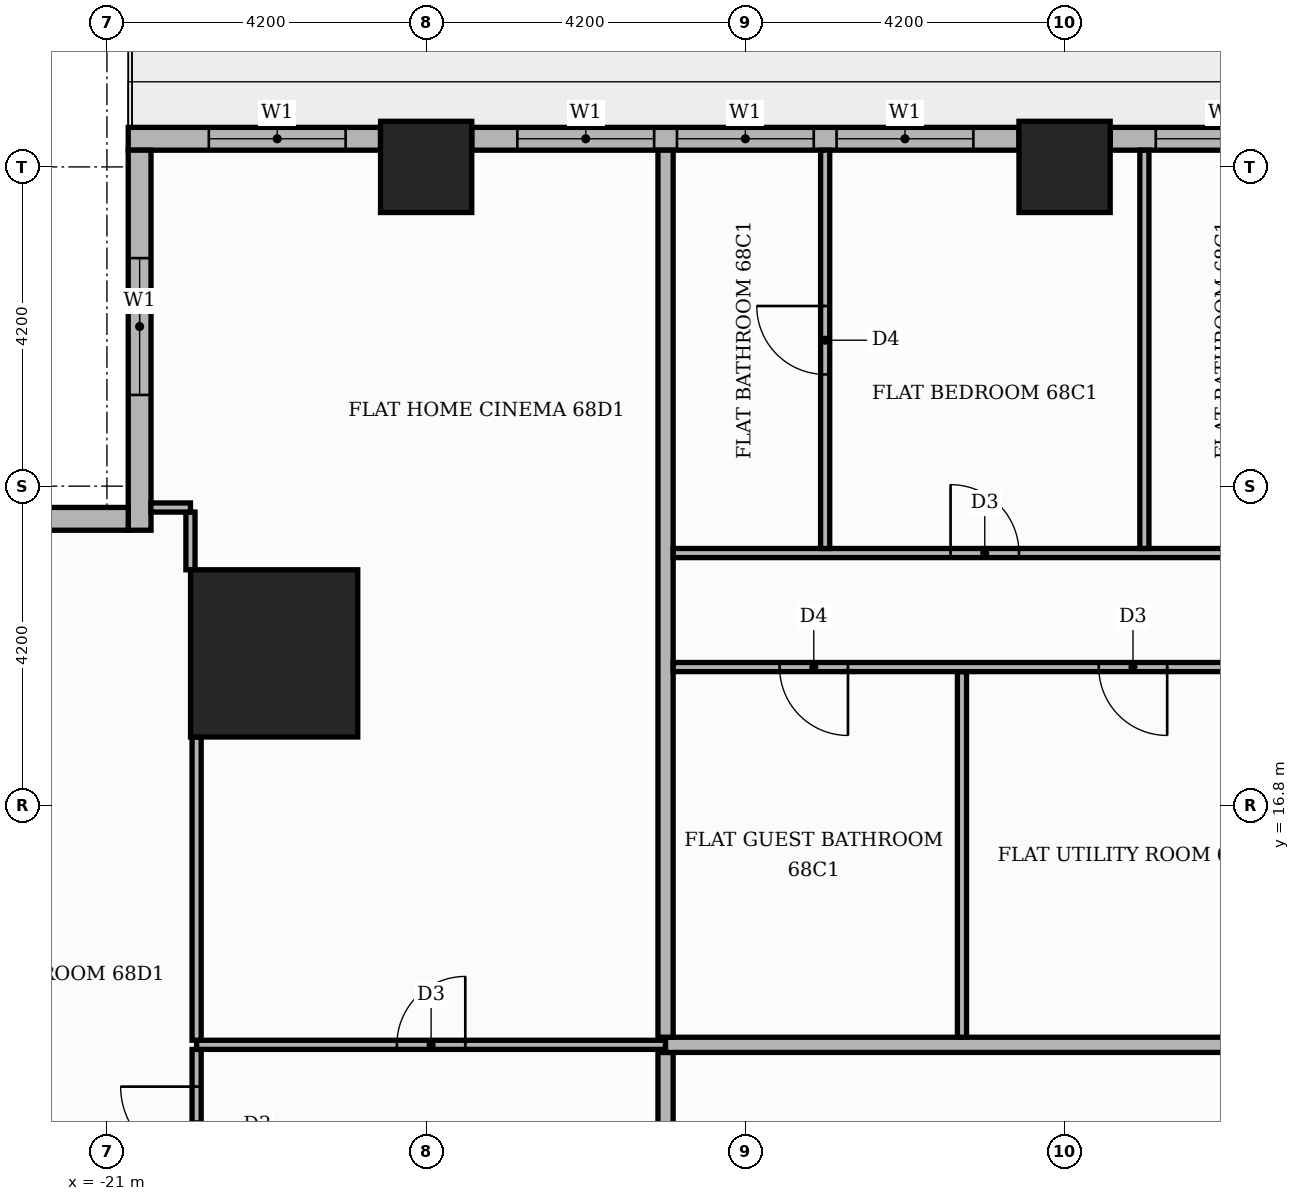
"""IFC4 building model, lengths in metres.
Left out: names, types, materials, properties, quantities, classifications, styles, units other than length and angle.
Written with IfcOpenShell. Run it as: python <this file> out.ifc"""

import sys

from ifc_helpers import new_model, si_unit, direction, frame, frame_2d, origin, origin_2d, place, context, subcontext, project, spatial, rectangle, extrude, element, fill, save


model = new_model("IFC4")
c1 = context("Model", 3, precision=1e-05, world=origin(), true_north=direction((0.0, 1.0)))
c2 = subcontext(c1, "Body", "Model", "MODEL_VIEW")
j1 = project(units=[si_unit("LENGTHUNIT", "METRE"), si_unit("PLANEANGLEUNIT", "RADIAN")], contexts=[c1])
p1 = place(None, origin())
s1 = spatial("IfcSite", under=j1, at=p1, CompositionType="ELEMENT")
p2 = place(p1, origin())
s2 = spatial("IfcBuilding", under=s1, at=p2, CompositionType="ELEMENT")
p3 = place(p2, frame((0.0, 0.0, 283.5)))
s3 = spatial("IfcBuildingStorey", under=s2, at=p3, CompositionType="ELEMENT", Elevation=283.5)
p4 = place(p3, frame((-18.8, 18.8, 0.0), z_axis=(0.0, 0.0, 1.0), x_axis=(1.0, 0.0, 0.0)))
e1 = element("IfcColumn", 1, at=p4, inside=s3, PredefinedType="COLUMN", context=c2, shape_type="SweptSolid", body=[
    extrude(rectangle(XDim=2.2, YDim=2.2, at=origin_2d()), origin(), (0.0, 0.0, 1.0), 3.9),
])
for number, where, z_axis, x_axis in (
    (2, (-8.4, 25.2, 0.0), (0.0, 0.0, 1.0), (1.0, 0.0, 0.0)),
    (3, (-16.8, 25.2, 0.0), (0.0, 0.0, 1.0), (1.0, 0.0, 0.0)),
):
    element("IfcColumn", number, at=place(p3, frame(where, z_axis=z_axis, x_axis=x_axis)), inside=s3, PredefinedType="COLUMN", context=c2, shape_type="SweptSolid", body=[
        extrude(rectangle(XDim=1.2, YDim=1.2, at=origin_2d()), origin(), (0.0, 0.0, 1.0), 3.9),
    ])
p5 = place(p3, frame((-0.6, 25.57, 0.0), z_axis=(0.0, 0.0, 1.0), x_axis=(-1.0, 0.0, 0.0)))
e4 = element("IfcWall", 4, at=p5, inside=s3, PredefinedType="STANDARD", context=c2, shape_type="SweptSolid", body=[
    extrude(rectangle(XDim=7.2, YDim=0.3, at=frame_2d((3.6, 0.0))), origin(), (0.0, 0.0, 1.0), 3.4),
])
p6 = place(p5, frame((0.6, 0.0, 0.9)))
e5 = element("IfcOpeningElement", 5, at=p6, cuts=e4, PredefinedType="OPENING", context=c2, shape_type="SweptSolid", body=[
    extrude(rectangle(XDim=3.9, YDim=2.1, at=frame_2d((1.95, 1.05))), frame((0.0, 0.16, 0.0), z_axis=(0.0, -1.0, 0.0), x_axis=(1.0, 0.0, 0.0)), (0.0, 0.0, 1.0), 0.32),
])
p7 = place(p5, frame((4.8, 0.0, 0.9)))
e6 = element("IfcOpeningElement", 6, at=p7, cuts=e4, PredefinedType="OPENING", context=c2, shape_type="SweptSolid", body=[
    extrude(rectangle(XDim=1.8, YDim=2.1, at=frame_2d((0.9, 1.05))), frame((0.0, 0.16, 0.0), z_axis=(0.0, -1.0, 0.0), x_axis=(1.0, 0.0, 0.0)), (0.0, 0.0, 1.0), 0.32),
])
p8 = place(p3, frame((-9.0, 25.57, 0.0), z_axis=(0.0, 0.0, 1.0), x_axis=(-1.0, 0.0, 0.0)))
e7 = element("IfcWall", 7, at=p8, inside=s3, PredefinedType="STANDARD", context=c2, shape_type="SweptSolid", body=[
    extrude(rectangle(XDim=7.2, YDim=0.3, at=frame_2d((3.6, 0.0))), origin(), (0.0, 0.0, 1.0), 3.4),
])
p9 = place(p8, frame((0.6, 0.0, 0.9)))
e8 = element("IfcOpeningElement", 8, at=p9, cuts=e7, PredefinedType="OPENING", context=c2, shape_type="SweptSolid", body=[
    extrude(rectangle(XDim=1.8, YDim=2.1, at=frame_2d((0.9, 1.05))), frame((0.0, 0.16, 0.0), z_axis=(0.0, -1.0, 0.0), x_axis=(1.0, 0.0, 0.0)), (0.0, 0.0, 1.0), 0.32),
])
p10 = place(p8, frame((2.7, 0.0, 0.9)))
e9 = element("IfcOpeningElement", 9, at=p10, cuts=e7, PredefinedType="OPENING", context=c2, shape_type="SweptSolid", body=[
    extrude(rectangle(XDim=1.8, YDim=2.1, at=frame_2d((0.9, 1.05))), frame((0.0, 0.16, 0.0), z_axis=(0.0, -1.0, 0.0), x_axis=(1.0, 0.0, 0.0)), (0.0, 0.0, 1.0), 0.32),
])
p11 = place(p8, frame((4.8, 0.0, 0.9)))
e10 = element("IfcOpeningElement", 10, at=p11, cuts=e7, PredefinedType="OPENING", context=c2, shape_type="SweptSolid", body=[
    extrude(rectangle(XDim=1.8, YDim=2.1, at=frame_2d((0.9, 1.05))), frame((0.0, 0.16, 0.0), z_axis=(0.0, -1.0, 0.0), x_axis=(1.0, 0.0, 0.0)), (0.0, 0.0, 1.0), 0.32),
])
p12 = place(p3, frame((-17.4, 25.57, 0.0), z_axis=(0.0, 0.0, 1.0), x_axis=(-1.0, 0.0, 0.0)))
e11 = element("IfcWall", 11, at=p12, inside=s3, PredefinedType="STANDARD", context=c2, shape_type="SweptSolid", body=[
    extrude(rectangle(XDim=3.32, YDim=0.3, at=frame_2d((1.66, 0.0))), origin(), (0.0, 0.0, 1.0), 3.4),
])
p13 = place(p12, frame((0.459, 0.0, 0.9)))
e12 = element("IfcOpeningElement", 12, at=p13, cuts=e11, PredefinedType="OPENING", context=c2, shape_type="SweptSolid", body=[
    extrude(rectangle(XDim=1.8, YDim=2.1, at=frame_2d((0.9, 1.05))), frame((0.0, 0.16, 0.0), z_axis=(0.0, -1.0, 0.0), x_axis=(1.0, 0.0, 0.0)), (0.0, 0.0, 1.0), 0.32),
])
p14 = place(p3, frame((-20.57, 25.42, 0.0), z_axis=(0.0, 0.0, 1.0), x_axis=(0.0, -1.0, 0.0)))
e13 = element("IfcWall", 13, at=p14, inside=s3, PredefinedType="STANDARD", context=c2, shape_type="SweptSolid", body=[
    extrude(rectangle(XDim=5.0, YDim=0.3, at=frame_2d((2.5, 0.0))), origin(), (0.0, 0.0, 1.0), 3.4),
])
p15 = place(p14, frame((1.42, 0.0, 0.9)))
e14 = element("IfcOpeningElement", 14, at=p15, cuts=e13, PredefinedType="OPENING", context=c2, shape_type="SweptSolid", body=[
    extrude(rectangle(XDim=1.8, YDim=2.1, at=frame_2d((0.9, 1.05))), frame((0.0, 0.16, 0.0), z_axis=(0.0, -1.0, 0.0), x_axis=(1.0, 0.0, 0.0)), (0.0, 0.0, 1.0), 0.32),
])
p16 = place(p3, frame((-20.72, 20.57, 0.0), z_axis=(0.0, 0.0, 1.0), x_axis=(-1.0, 0.0, 0.0)))
e15 = element("IfcWall", 15, at=p16, inside=s3, PredefinedType="STANDARD", context=c2, shape_type="SweptSolid", body=[
    extrude(rectangle(XDim=5.0, YDim=0.3, at=frame_2d((2.5, 0.0))), origin(), (0.0, 0.0, 1.0), 3.4),
])
p17 = place(p16, frame((1.48, 0.0, 0.9)))
e16 = element("IfcOpeningElement", 16, at=p17, cuts=e15, PredefinedType="OPENING", context=c2, shape_type="SweptSolid", body=[
    extrude(rectangle(XDim=1.8, YDim=2.1, at=frame_2d((0.9, 1.05))), frame((0.0, 0.16, 0.0), z_axis=(0.0, -1.0, 0.0), x_axis=(1.0, 0.0, 0.0)), (0.0, 0.0, 1.0), 0.32),
])
p18 = place(p3, frame((-13.65, 11.1, 0.0), z_axis=(0.0, 0.0, 1.0), x_axis=(0.0, 1.0, 0.0)))
e17 = element("IfcWall", 17, at=p18, inside=s3, PredefinedType="PARTITIONING", context=c2, shape_type="SweptSolid", body=[
    extrude(rectangle(XDim=2.45, YDim=0.2, at=frame_2d((1.225, 0.0))), origin(), (0.0, 0.0, 1.0), 3.4),
])
p19 = place(p3, frame((-19.82, 11.61, 0.0), z_axis=(0.0, 0.0, 1.0), x_axis=(0.0, 1.0, 0.0)))
e18 = element("IfcWall", 18, at=p19, inside=s3, PredefinedType="PARTITIONING", context=c2, shape_type="SweptSolid", body=[
    extrude(rectangle(XDim=1.98, YDim=0.12, at=frame_2d((0.99, 0.0))), origin(), (0.0, 0.0, 1.0), 3.4),
])
p20 = place(p19, frame((0.49, 0.0, 0.0)))
e19 = element("IfcOpeningElement", 19, at=p20, cuts=e18, PredefinedType="OPENING", context=c2, shape_type="SweptSolid", body=[
    extrude(rectangle(XDim=1.0, YDim=2.1, at=frame_2d((0.5, 1.05))), frame((0.0, 0.07, 0.0), z_axis=(0.0, -1.0, 0.0), x_axis=(1.0, 0.0, 0.0)), (0.0, 0.0, 1.0), 0.14),
])
p21 = place(p3, frame((-19.82, 13.65, 0.0), z_axis=(0.0, 0.0, 1.0), x_axis=(1.0, 0.0, 0.0)))
e20 = element("IfcWall", 20, at=p21, inside=s3, PredefinedType="PARTITIONING", context=c2, shape_type="SweptSolid", body=[
    extrude(rectangle(XDim=6.17, YDim=0.12, at=frame_2d((3.085, 0.0))), origin(), (0.0, 0.0, 1.0), 3.4),
])
p22 = place(p21, frame((2.635, 0.0, 0.0)))
e21 = element("IfcOpeningElement", 21, at=p22, cuts=e20, PredefinedType="OPENING", context=c2, shape_type="SweptSolid", body=[
    extrude(rectangle(XDim=0.9, YDim=2.1, at=frame_2d((0.45, 1.05))), frame((0.0, 0.07, 0.0), z_axis=(0.0, -1.0, 0.0), x_axis=(1.0, 0.0, 0.0)), (0.0, 0.0, 1.0), 0.14),
])
p23 = place(p3, frame((-13.65, 13.65, 0.0), z_axis=(0.0, 0.0, 1.0), x_axis=(1.0, 0.0, 0.0)))
e22 = element("IfcWall", 22, at=p23, inside=s3, PredefinedType="PARTITIONING", context=c2, shape_type="SweptSolid", body=[
    extrude(rectangle(XDim=39.07, YDim=0.2, at=frame_2d((19.535, 0.0))), origin(), (0.0, 0.0, 1.0), 3.4),
])
p24 = place(p23, frame((23.6, 0.0, 0.0)))
e23 = element("IfcOpeningElement", 23, at=p24, cuts=e22, PredefinedType="OPENING", context=c2, shape_type="SweptSolid", body=[
    extrude(rectangle(XDim=1.1, YDim=2.4, at=frame_2d((0.55, 1.2))), frame((0.0, 0.11, 0.0), z_axis=(0.0, -1.0, 0.0), x_axis=(1.0, 0.0, 0.0)), (0.0, 0.0, 1.0), 0.22),
])
p25 = place(p3, frame((-19.82, 13.71, 0.0), z_axis=(0.0, 0.0, 1.0), x_axis=(0.0, 1.0, 0.0)))
e24 = element("IfcWall", 24, at=p25, inside=s3, PredefinedType="PARTITIONING", context=c2, shape_type="SweptSolid", body=[
    extrude(rectangle(XDim=3.99, YDim=0.12, at=frame_2d((1.995, 0.0))), origin(), (0.0, 0.0, 1.0), 3.4),
])
p26 = place(p3, frame((-13.65, 13.75, 0.0), z_axis=(0.0, 0.0, 1.0), x_axis=(0.0, 1.0, 0.0)))
e25 = element("IfcWall", 25, at=p26, inside=s3, PredefinedType="PARTITIONING", context=c2, shape_type="SweptSolid", body=[
    extrude(rectangle(XDim=11.67, YDim=0.2, at=frame_2d((5.835, 0.0))), origin(), (0.0, 0.0, 1.0), 3.4),
])
p27 = place(p3, frame((-9.75, 13.75, 0.0), z_axis=(0.0, 0.0, 1.0), x_axis=(0.0, 1.0, 0.0)))
e26 = element("IfcWall", 26, at=p27, inside=s3, PredefinedType="PARTITIONING", context=c2, shape_type="SweptSolid", body=[
    extrude(rectangle(XDim=4.81, YDim=0.12, at=frame_2d((2.405, 0.0))), origin(), (0.0, 0.0, 1.0), 3.4),
])
p28 = place(p3, frame((-13.55, 18.62, 0.0), z_axis=(0.0, 0.0, 1.0), x_axis=(1.0, 0.0, 0.0)))
e27 = element("IfcWall", 27, at=p28, inside=s3, PredefinedType="PARTITIONING", context=c2, shape_type="SweptSolid", body=[
    extrude(rectangle(XDim=20.9, YDim=0.12, at=frame_2d((10.45, 0.0))), origin(), (0.0, 0.0, 1.0), 3.4),
])
p29 = place(p28, frame((16.925, 0.0, 0.0)))
e28 = element("IfcOpeningElement", 28, at=p29, cuts=e27, PredefinedType="OPENING", context=c2, shape_type="SweptSolid", body=[
    extrude(rectangle(XDim=0.9, YDim=2.1, at=frame_2d((0.45, 1.05))), frame((0.0, 0.07, 0.0), z_axis=(0.0, -1.0, 0.0), x_axis=(1.0, 0.0, 0.0)), (0.0, 0.0, 1.0), 0.14),
])
p30 = place(p28, frame((11.675, 0.0, 0.0)))
e29 = element("IfcOpeningElement", 29, at=p30, cuts=e27, PredefinedType="OPENING", context=c2, shape_type="SweptSolid", body=[
    extrude(rectangle(XDim=0.9, YDim=2.1, at=frame_2d((0.45, 1.05))), frame((0.0, 0.07, 0.0), z_axis=(0.0, -1.0, 0.0), x_axis=(1.0, 0.0, 0.0)), (0.0, 0.0, 1.0), 0.14),
])
p31 = place(p28, frame((8.9, 0.0, 0.0)))
e30 = element("IfcOpeningElement", 30, at=p31, cuts=e27, PredefinedType="OPENING", context=c2, shape_type="SweptSolid", body=[
    extrude(rectangle(XDim=0.9, YDim=2.1, at=frame_2d((0.45, 1.05))), frame((0.0, 0.07, 0.0), z_axis=(0.0, -1.0, 0.0), x_axis=(1.0, 0.0, 0.0)), (0.0, 0.0, 1.0), 0.14),
])
p32 = place(p28, frame((5.6, 0.0, 0.0)))
e31 = element("IfcOpeningElement", 31, at=p32, cuts=e27, PredefinedType="OPENING", context=c2, shape_type="SweptSolid", body=[
    extrude(rectangle(XDim=0.9, YDim=2.1, at=frame_2d((0.45, 1.05))), frame((0.0, 0.07, 0.0), z_axis=(0.0, -1.0, 0.0), x_axis=(1.0, 0.0, 0.0)), (0.0, 0.0, 1.0), 0.14),
])
p33 = place(p28, frame((1.4, 0.0, 0.0)))
e32 = element("IfcOpeningElement", 32, at=p33, cuts=e27, PredefinedType="OPENING", context=c2, shape_type="SweptSolid", body=[
    extrude(rectangle(XDim=0.9, YDim=2.1, at=frame_2d((0.45, 1.05))), frame((0.0, 0.07, 0.0), z_axis=(0.0, -1.0, 0.0), x_axis=(1.0, 0.0, 0.0)), (0.0, 0.0, 1.0), 0.14),
])
p34 = place(p3, frame((-19.901, 19.9, 0.0), z_axis=(0.0, 0.0, 1.0), x_axis=(0.0, 1.0, 0.0)))
e33 = element("IfcWall", 33, at=p34, inside=s3, PredefinedType="PARTITIONING", context=c2, shape_type="SweptSolid", body=[
    extrude(rectangle(XDim=0.759, YDim=0.12, at=frame_2d((0.379, 0.0))), origin(), (0.0, 0.0, 1.0), 3.4),
])
p35 = place(p3, frame((-13.55, 20.12, 0.0), z_axis=(0.0, 0.0, 1.0), x_axis=(1.0, 0.0, 0.0)))
e34 = element("IfcWall", 34, at=p35, inside=s3, PredefinedType="PARTITIONING", context=c2, shape_type="SweptSolid", body=[
    extrude(rectangle(XDim=34.269, YDim=0.12, at=frame_2d((17.135, 0.0))), origin(), (0.0, 0.0, 1.0), 3.4),
])
p36 = place(p35, frame((25.65, 0.0, 0.0)))
e35 = element("IfcOpeningElement", 35, at=p36, cuts=e34, PredefinedType="OPENING", context=c2, shape_type="SweptSolid", body=[
    extrude(rectangle(XDim=1.0, YDim=2.1, at=frame_2d((0.5, 1.05))), frame((0.0, 0.07, 0.0), z_axis=(0.0, -1.0, 0.0), x_axis=(1.0, 0.0, 0.0)), (0.0, 0.0, 1.0), 0.14),
])
p37 = place(p35, frame((22.55, 0.0, 0.0)))
e36 = element("IfcOpeningElement", 36, at=p37, cuts=e34, PredefinedType="OPENING", context=c2, shape_type="SweptSolid", body=[
    extrude(rectangle(XDim=0.9, YDim=2.1, at=frame_2d((0.45, 1.05))), frame((0.0, 0.07, 0.0), z_axis=(0.0, -1.0, 0.0), x_axis=(1.0, 0.0, 0.0)), (0.0, 0.0, 1.0), 0.14),
])
p38 = place(p35, frame((18.35, 0.0, 0.0)))
e37 = element("IfcOpeningElement", 37, at=p38, cuts=e34, PredefinedType="OPENING", context=c2, shape_type="SweptSolid", body=[
    extrude(rectangle(XDim=0.9, YDim=2.1, at=frame_2d((0.45, 1.05))), frame((0.0, 0.07, 0.0), z_axis=(0.0, -1.0, 0.0), x_axis=(1.0, 0.0, 0.0)), (0.0, 0.0, 1.0), 0.14),
])
p39 = place(p35, frame((9.95, 0.0, 0.0)))
e38 = element("IfcOpeningElement", 38, at=p39, cuts=e34, PredefinedType="OPENING", context=c2, shape_type="SweptSolid", body=[
    extrude(rectangle(XDim=0.9, YDim=2.1, at=frame_2d((0.45, 1.05))), frame((0.0, 0.07, 0.0), z_axis=(0.0, -1.0, 0.0), x_axis=(1.0, 0.0, 0.0)), (0.0, 0.0, 1.0), 0.14),
])
p40 = place(p35, frame((3.65, 0.0, 0.0)))
e39 = element("IfcOpeningElement", 39, at=p40, cuts=e34, PredefinedType="OPENING", context=c2, shape_type="SweptSolid", body=[
    extrude(rectangle(XDim=0.9, YDim=2.1, at=frame_2d((0.45, 1.05))), frame((0.0, 0.07, 0.0), z_axis=(0.0, -1.0, 0.0), x_axis=(1.0, 0.0, 0.0)), (0.0, 0.0, 1.0), 0.14),
])
p41 = place(p3, frame((-11.55, 20.18, 0.0), z_axis=(0.0, 0.0, 1.0), x_axis=(0.0, 1.0, 0.0)))
e40 = element("IfcWall", 40, at=p41, inside=s3, PredefinedType="PARTITIONING", context=c2, shape_type="SweptSolid", body=[
    extrude(rectangle(XDim=5.24, YDim=0.12, at=frame_2d((2.62, 0.0))), origin(), (0.0, 0.0, 1.0), 3.4),
])
p42 = place(p41, frame((2.29, 0.0, 0.0)))
e41 = element("IfcOpeningElement", 41, at=p42, cuts=e40, PredefinedType="OPENING", context=c2, shape_type="SweptSolid", body=[
    extrude(rectangle(XDim=0.9, YDim=2.1, at=frame_2d((0.45, 1.05))), frame((0.0, 0.07, 0.0), z_axis=(0.0, -1.0, 0.0), x_axis=(1.0, 0.0, 0.0)), (0.0, 0.0, 1.0), 0.14),
])
p43 = place(p3, frame((-7.35, 20.18, 0.0), z_axis=(0.0, 0.0, 1.0), x_axis=(0.0, 1.0, 0.0)))
e42 = element("IfcWall", 42, at=p43, inside=s3, PredefinedType="PARTITIONING", context=c2, shape_type="SweptSolid", body=[
    extrude(rectangle(XDim=5.24, YDim=0.12, at=frame_2d((2.62, 0.0))), origin(), (0.0, 0.0, 1.0), 3.4),
])
p44 = place(p3, frame((-20.421, 20.719, 0.0), z_axis=(0.0, 0.0, 1.0), x_axis=(1.0, 0.0, 0.0)))
e43 = element("IfcWall", 43, at=p44, inside=s3, PredefinedType="PARTITIONING", context=c2, shape_type="SweptSolid", body=[
    extrude(rectangle(XDim=0.52, YDim=0.12, at=frame_2d((0.26, 0.0))), origin(), (0.0, 0.0, 1.0), 3.4),
])
p45 = place(p7, origin())
e44 = element("IfcWindow", 44, at=p45, inside=s3, PartitioningType="SINGLE_PANEL", PredefinedType="WINDOW", context=c2, shape_type="SweptSolid", body=[
    extrude(rectangle(XDim=1.8, YDim=2.1, at=frame_2d((0.9, 1.05))), frame((0.0, 0.03, 0.0), z_axis=(0.0, -1.0, 0.0), x_axis=(1.0, 0.0, 0.0)), (0.0, 0.0, 1.0), 0.06),
])
fill(e6, e44)
p46 = place(p9, origin())
e45 = element("IfcWindow", 45, at=p46, inside=s3, PartitioningType="SINGLE_PANEL", PredefinedType="WINDOW", context=c2, shape_type="SweptSolid", body=[
    extrude(rectangle(XDim=1.8, YDim=2.1, at=frame_2d((0.9, 1.05))), frame((0.0, 0.03, 0.0), z_axis=(0.0, -1.0, 0.0), x_axis=(1.0, 0.0, 0.0)), (0.0, 0.0, 1.0), 0.06),
])
fill(e8, e45)
p47 = place(p10, origin())
e46 = element("IfcWindow", 46, at=p47, inside=s3, PartitioningType="SINGLE_PANEL", PredefinedType="WINDOW", context=c2, shape_type="SweptSolid", body=[
    extrude(rectangle(XDim=1.8, YDim=2.1, at=frame_2d((0.9, 1.05))), frame((0.0, 0.03, 0.0), z_axis=(0.0, -1.0, 0.0), x_axis=(1.0, 0.0, 0.0)), (0.0, 0.0, 1.0), 0.06),
])
fill(e9, e46)
p48 = place(p11, origin())
e47 = element("IfcWindow", 47, at=p48, inside=s3, PartitioningType="SINGLE_PANEL", PredefinedType="WINDOW", context=c2, shape_type="SweptSolid", body=[
    extrude(rectangle(XDim=1.8, YDim=2.1, at=frame_2d((0.9, 1.05))), frame((0.0, 0.03, 0.0), z_axis=(0.0, -1.0, 0.0), x_axis=(1.0, 0.0, 0.0)), (0.0, 0.0, 1.0), 0.06),
])
fill(e10, e47)
p49 = place(p13, origin())
e48 = element("IfcWindow", 48, at=p49, inside=s3, PartitioningType="SINGLE_PANEL", PredefinedType="WINDOW", context=c2, shape_type="SweptSolid", body=[
    extrude(rectangle(XDim=1.8, YDim=2.1, at=frame_2d((0.9, 1.05))), frame((0.0, 0.03, 0.0), z_axis=(0.0, -1.0, 0.0), x_axis=(1.0, 0.0, 0.0)), (0.0, 0.0, 1.0), 0.06),
])
fill(e12, e48)
p50 = place(p15, origin())
e49 = element("IfcWindow", 49, at=p50, inside=s3, PartitioningType="SINGLE_PANEL", PredefinedType="WINDOW", context=c2, shape_type="SweptSolid", body=[
    extrude(rectangle(XDim=1.8, YDim=2.1, at=frame_2d((0.9, 1.05))), frame((0.0, 0.03, 0.0), z_axis=(0.0, -1.0, 0.0), x_axis=(1.0, 0.0, 0.0)), (0.0, 0.0, 1.0), 0.06),
])
fill(e14, e49)
p51 = place(p32, frame((0.9, 0.0, 0.0), z_axis=(0.0, 0.0, 1.0), x_axis=(-1.0, 0.0, 0.0)))
e50 = element("IfcDoor", 50, at=p51, inside=s3, OperationType="SINGLE_SWING_RIGHT", PredefinedType="DOOR", context=c2, shape_type="SweptSolid", body=[
    extrude(rectangle(XDim=0.9, YDim=2.1, at=frame_2d((0.45, 1.05))), frame((0.0, 0.025, 0.0), z_axis=(0.0, -1.0, 0.0), x_axis=(1.0, 0.0, 0.0)), (0.0, 0.0, 1.0), 0.05),
])
fill(e31, e50)
p52 = place(p33, frame((0.9, 0.0, 0.0), z_axis=(0.0, 0.0, 1.0), x_axis=(-1.0, 0.0, 0.0)))
e51 = element("IfcDoor", 51, at=p52, inside=s3, OperationType="SINGLE_SWING_RIGHT", PredefinedType="DOOR", context=c2, shape_type="SweptSolid", body=[
    extrude(rectangle(XDim=0.9, YDim=2.1, at=frame_2d((0.45, 1.05))), frame((0.0, 0.025, 0.0), z_axis=(0.0, -1.0, 0.0), x_axis=(1.0, 0.0, 0.0)), (0.0, 0.0, 1.0), 0.05),
])
fill(e32, e51)
p53 = place(p40, origin())
e52 = element("IfcDoor", 52, at=p53, inside=s3, OperationType="SINGLE_SWING_LEFT", PredefinedType="DOOR", context=c2, shape_type="SweptSolid", body=[
    extrude(rectangle(XDim=0.9, YDim=2.1, at=frame_2d((0.45, 1.05))), frame((0.0, 0.025, 0.0), z_axis=(0.0, -1.0, 0.0), x_axis=(1.0, 0.0, 0.0)), (0.0, 0.0, 1.0), 0.05),
])
fill(e39, e52)
p54 = place(p42, origin())
e53 = element("IfcDoor", 53, at=p54, inside=s3, OperationType="SINGLE_SWING_RIGHT", PredefinedType="DOOR", context=c2, shape_type="SweptSolid", body=[
    extrude(rectangle(XDim=0.9, YDim=2.1, at=frame_2d((0.45, 1.05))), frame((0.0, 0.025, 0.0), z_axis=(0.0, -1.0, 0.0), x_axis=(1.0, 0.0, 0.0)), (0.0, 0.0, 1.0), 0.05),
])
fill(e41, e53)
p55 = place(p22, origin())
e54 = element("IfcDoor", 54, at=p55, inside=s3, OperationType="SINGLE_SWING_RIGHT", PredefinedType="DOOR", context=c2, shape_type="SweptSolid", body=[
    extrude(rectangle(XDim=0.9, YDim=2.1, at=frame_2d((0.45, 1.05))), frame((0.0, 0.025, 0.0), z_axis=(0.0, -1.0, 0.0), x_axis=(1.0, 0.0, 0.0)), (0.0, 0.0, 1.0), 0.05),
])
fill(e21, e54)
p56 = place(p20, origin())
e55 = element("IfcDoor", 55, at=p56, inside=s3, OperationType="SINGLE_SWING_RIGHT", PredefinedType="DOOR", context=c2, shape_type="SweptSolid", body=[
    extrude(rectangle(XDim=1.0, YDim=2.1, at=frame_2d((0.5, 1.05))), frame((0.0, 0.025, 0.0), z_axis=(0.0, -1.0, 0.0), x_axis=(1.0, 0.0, 0.0)), (0.0, 0.0, 1.0), 0.05),
])
fill(e19, e55)
save(model, sys.argv[1])
